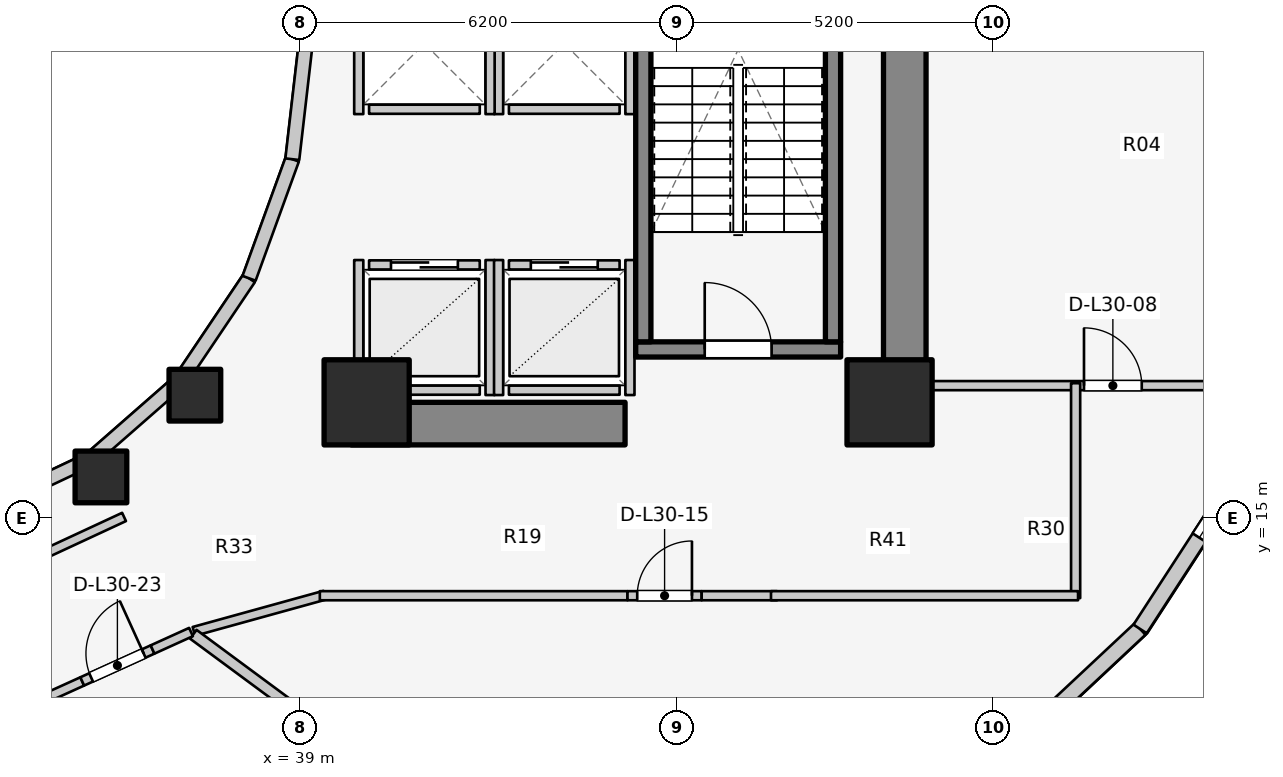
"""IFC4 building model, lengths in metres.
Left out: names, types, materials, properties, quantities, classifications, styles, units other than length and angle.
Written with IfcOpenShell. Run it as: python <this file> out.ifc"""

import sys

from ifc_helpers import new_model, si_unit, direction, frame, frame_2d, origin, origin_2d, place, context, subcontext, project, spatial, rectangle, extrude, element, fill, save


model = new_model("IFC4")
c1 = context("Model", 3, precision=1e-05, world=origin(), true_north=direction((0.0, 1.0)))
c2 = subcontext(c1, "Body", "Model", "MODEL_VIEW")
j1 = project(units=[si_unit("LENGTHUNIT", "METRE"), si_unit("PLANEANGLEUNIT", "RADIAN")], contexts=[c1])
p1 = place(None, origin())
s1 = spatial("IfcSite", under=j1, at=p1, CompositionType="ELEMENT")
p2 = place(p1, origin())
s2 = spatial("IfcBuilding", under=s1, at=p2, CompositionType="ELEMENT")
p3 = place(p2, frame((0.0, 0.0, 101.1)))
s3 = spatial("IfcBuildingStorey", under=s2, at=p3, CompositionType="ELEMENT", Elevation=101.1)
p4 = place(p3, frame((48.95, 17.05, 0.0), z_axis=(0.0, 0.0, 1.0), x_axis=(0.0, 1.0, 0.0)))
e1 = element("IfcWall", 1, at=p4, inside=s3, PredefinedType="SHEAR", context=c2, shape_type="SweptSolid", body=[
    extrude(rectangle(XDim=12.8, YDim=0.7, at=frame_2d((6.4, 0.0))), origin(), (0.0, 0.0, 1.0), 3.1),
])
p5 = place(p3, frame((39.85, 16.55, 0.0), z_axis=(0.0, 0.0, 1.0), x_axis=(1.0, 0.0, 0.0)))
e2 = element("IfcWall", 2, at=p5, inside=s3, PredefinedType="SHEAR", context=c2, shape_type="SweptSolid", body=[
    extrude(rectangle(XDim=4.5, YDim=0.7, at=frame_2d((2.25, 0.0))), origin(), (0.0, 0.0, 1.0), 3.1),
])
p6 = place(p3, frame((44.525, 17.77, 0.0), z_axis=(0.0, 0.0, 1.0), x_axis=(1.0, 0.0, 0.0)))
e3 = element("IfcWall", 3, at=p6, inside=s3, PredefinedType="SOLIDWALL", context=c2, shape_type="SweptSolid", body=[
    extrude(rectangle(XDim=3.37, YDim=0.25, at=frame_2d((1.685, 0.0))), origin(), (0.0, 0.0, 1.0), 3.1),
])
p7 = place(p6, frame((1.135, 0.0, 0.0)))
e4 = element("IfcOpeningElement", 4, at=p7, cuts=e3, PredefinedType="OPENING", context=c2, shape_type="SweptSolid", body=[
    extrude(rectangle(XDim=1.1, YDim=2.1, at=frame_2d((0.55, 1.05))), frame((0.0, 0.135, 0.0), z_axis=(0.0, -1.0, 0.0), x_axis=(1.0, 0.0, 0.0)), (0.0, 0.0, 1.0), 0.27),
])
for number, where, z_axis, x_axis in (
    (5, (44.65, 17.895, 0.0), (0.0, 0.0, 1.0), (0.0, 1.0, 0.0)),
    (6, (47.77, 17.895, 0.0), (0.0, 0.0, 1.0), (0.0, 1.0, 0.0)),
):
    element("IfcWall", number, at=place(p3, frame(where, z_axis=z_axis, x_axis=x_axis)), inside=s3, PredefinedType="SOLIDWALL", context=c2, shape_type="SweptSolid", body=[
        extrude(rectangle(XDim=7.81, YDim=0.25, at=frame_2d((3.905, 0.0))), origin(), (0.0, 0.0, 1.0), 3.1),
    ])
for number, where, z_axis, x_axis in (
    (7, (40.1, 16.9, 0.0), (0.0, 0.0, 1.0), (1.0, 0.0, 0.0)),
    (8, (48.7, 16.9, 0.0), (0.0, 0.0, 1.0), (1.0, 0.0, 0.0)),
):
    element("IfcColumn", number, at=place(p3, frame(where, z_axis=z_axis, x_axis=x_axis)), inside=s3, PredefinedType="COLUMN", context=c2, shape_type="SweptSolid", body=[
        extrude(rectangle(XDim=1.4, YDim=1.4, at=origin_2d()), origin(), (0.0, 0.0, 1.0), 3.1),
    ])
for number, where, z_axis, x_axis in (
    (9, (35.73, 15.673, 0.0), (0.0, 0.0, 1.0), (1.0, 0.0, 0.0)),
    (10, (37.275, 17.018, 0.0), (0.0, 0.0, 1.0), (1.0, 0.0, 0.0)),
):
    element("IfcColumn", number, at=place(p3, frame(where, z_axis=z_axis, x_axis=x_axis)), inside=s3, PredefinedType="COLUMN", context=c2, shape_type="SweptSolid", body=[
        extrude(rectangle(XDim=0.85, YDim=0.85, at=origin_2d()), origin(), (0.0, 0.0, 1.0), 3.1),
    ])
p8 = place(p3, frame((33.843, 15.157, 0.0), z_axis=(0.0, 0.0, 1.0), x_axis=(0.904179699603, 0.427152280606, 0.0)))
e11 = element("IfcWall", 11, at=p8, inside=s3, PredefinedType="STANDARD", context=c2, shape_type="SweptSolid", body=[
    extrude(rectangle(XDim=1.899, YDim=0.23, at=frame_2d((0.95, 0.0))), origin(), (0.0, 0.0, 1.0), 1.22),
])
p9 = place(p3, frame((35.56, 15.968, 0.0), z_axis=(0.0, 0.0, 1.0), x_axis=(0.752576694707, 0.658504607869, 0.0)))
e12 = element("IfcWall", 12, at=p9, inside=s3, PredefinedType="STANDARD", context=c2, shape_type="SweptSolid", body=[
    extrude(rectangle(XDim=1.959, YDim=0.23, at=frame_2d((0.98, 0.0))), origin(), (0.0, 0.0, 1.0), 1.22),
])
p10 = place(p3, frame((37.035, 17.258, 0.0), z_axis=(0.0, 0.0, 1.0), x_axis=(0.558197800898, 0.829707909492, 0.0)))
e13 = element("IfcWall", 13, at=p10, inside=s3, PredefinedType="STANDARD", context=c2, shape_type="SweptSolid", body=[
    extrude(rectangle(XDim=2.027, YDim=0.23, at=frame_2d((1.013, 0.0))), origin(), (0.0, 0.0, 1.0), 1.22),
])
p11 = place(p3, frame((38.166, 18.94, 0.0), z_axis=(0.0, 0.0, 1.0), x_axis=(0.341423187295, 0.93990968033, 0.0)))
e14 = element("IfcWall", 14, at=p11, inside=s3, PredefinedType="STANDARD", context=c2, shape_type="SweptSolid", body=[
    extrude(rectangle(XDim=2.084, YDim=0.23, at=frame_2d((1.042, 0.0))), origin(), (0.0, 0.0, 1.0), 2.56),
])
p12 = place(p3, frame((38.877, 20.898, 0.0), z_axis=(0.0, 0.0, 1.0), x_axis=(0.114711713601, 0.993398823617, 0.0)))
e15 = element("IfcWall", 15, at=p12, inside=s3, PredefinedType="STANDARD", context=c2, shape_type="SweptSolid", body=[
    extrude(rectangle(XDim=2.115, YDim=0.23, at=frame_2d((1.058, 0.0))), origin(), (0.0, 0.0, 1.0), 2.56),
])
p13 = place(p3, frame((49.266, 9.847, 0.0), z_axis=(0.0, 0.0, 1.0), x_axis=(0.730162452258, 0.68327358599, 0.0)))
e16 = element("IfcWall", 16, at=p13, inside=s3, PredefinedType="STANDARD", context=c2, shape_type="SweptSolid", body=[
    extrude(rectangle(XDim=4.868, YDim=0.26, at=frame_2d((2.434, 0.0))), origin(), (0.0, 0.0, 1.0), 1.22),
])
p14 = place(p13, frame((1.834, 0.0, 0.15)))
e17 = element("IfcOpeningElement", 17, at=p14, cuts=e16, PredefinedType="OPENING", context=c2, shape_type="SweptSolid", body=[
    extrude(rectangle(XDim=1.2, YDim=0.9, at=frame_2d((0.6, 0.45))), frame((0.0, 0.14, 0.0), z_axis=(0.0, -1.0, 0.0), x_axis=(1.0, 0.0, 0.0)), (0.0, 0.0, 1.0), 0.28),
])
p15 = place(p3, frame((52.821, 13.173, 0.0), z_axis=(0.0, 0.0, 1.0), x_axis=(0.544388392991, 0.838833283541, 0.0)))
e18 = element("IfcWall", 18, at=p15, inside=s3, PredefinedType="STANDARD", context=c2, shape_type="SweptSolid", body=[
    extrude(rectangle(XDim=4.778, YDim=0.26, at=frame_2d((2.389, 0.0))), origin(), (0.0, 0.0, 1.0), 1.22),
])
p16 = place(p15, frame((1.789, 0.0, 0.15)))
e19 = element("IfcOpeningElement", 19, at=p16, cuts=e18, PredefinedType="OPENING", context=c2, shape_type="SweptSolid", body=[
    extrude(rectangle(XDim=1.2, YDim=0.9, at=frame_2d((0.6, 0.45))), frame((0.0, 0.14, 0.0), z_axis=(0.0, -1.0, 0.0), x_axis=(1.0, 0.0, 0.0)), (0.0, 0.0, 1.0), 0.28),
])
p17 = place(p3, frame((40.14, 19.16, 0.0), z_axis=(0.0, 0.0, 1.0), x_axis=(1.0, 0.0, 0.0)))
e20 = element("IfcWall", 20, at=p17, inside=s3, PredefinedType="SOLIDWALL", context=c2, shape_type="SweptSolid", body=[
    extrude(rectangle(XDim=1.82, YDim=0.15, at=frame_2d((0.91, 0.0))), origin(), (0.0, 0.0, 1.0), 2.12),
])
p18 = place(p17, frame((0.36, 0.0, 0.0)))
e21 = element("IfcOpeningElement", 21, at=p18, cuts=e20, PredefinedType="OPENING", context=c2, shape_type="SweptSolid", body=[
    extrude(rectangle(XDim=1.1, YDim=2.1, at=frame_2d((0.55, 1.05))), frame((0.0, 0.085, 0.0), z_axis=(0.0, -1.0, 0.0), x_axis=(1.0, 0.0, 0.0)), (0.0, 0.0, 1.0), 0.17),
])
p19 = place(p3, frame((40.14, 17.1, 0.0), z_axis=(0.0, 0.0, 1.0), x_axis=(1.0, 0.0, 0.0)))
e22 = element("IfcWall", 22, at=p19, inside=s3, PredefinedType="SOLIDWALL", context=c2, shape_type="SweptSolid", body=[
    extrude(rectangle(XDim=1.82, YDim=0.15, at=frame_2d((0.91, 0.0))), origin(), (0.0, 0.0, 1.0), 2.12),
])
p20 = place(p3, frame((39.97, 17.02, 0.0), z_axis=(0.0, 0.0, 1.0), x_axis=(0.0, 1.0, 0.0)))
e23 = element("IfcWall", 23, at=p20, inside=s3, PredefinedType="SOLIDWALL", context=c2, shape_type="SweptSolid", body=[
    extrude(rectangle(XDim=2.22, YDim=0.15, at=frame_2d((1.11, 0.0))), origin(), (0.0, 0.0, 1.0), 1.873),
])
p21 = place(p3, frame((42.13, 17.02, 0.0), z_axis=(0.0, 0.0, 1.0), x_axis=(0.0, 1.0, 0.0)))
e24 = element("IfcWall", 24, at=p21, inside=s3, PredefinedType="SOLIDWALL", context=c2, shape_type="SweptSolid", body=[
    extrude(rectangle(XDim=2.22, YDim=0.15, at=frame_2d((1.11, 0.0))), origin(), (0.0, 0.0, 1.0), 2.575),
])
p22 = place(p3, frame((42.44, 19.16, 0.0), z_axis=(0.0, 0.0, 1.0), x_axis=(1.0, 0.0, 0.0)))
e25 = element("IfcWall", 25, at=p22, inside=s3, PredefinedType="SOLIDWALL", context=c2, shape_type="SweptSolid", body=[
    extrude(rectangle(XDim=1.82, YDim=0.15, at=frame_2d((0.91, 0.0))), origin(), (0.0, 0.0, 1.0), 2.575),
])
p23 = place(p22, frame((0.36, 0.0, 0.0)))
e26 = element("IfcOpeningElement", 26, at=p23, cuts=e25, PredefinedType="OPENING", context=c2, shape_type="SweptSolid", body=[
    extrude(rectangle(XDim=1.1, YDim=2.1, at=frame_2d((0.55, 1.05))), frame((0.0, 0.085, 0.0), z_axis=(0.0, -1.0, 0.0), x_axis=(1.0, 0.0, 0.0)), (0.0, 0.0, 1.0), 0.17),
])
p24 = place(p3, frame((42.44, 17.1, 0.0), z_axis=(0.0, 0.0, 1.0), x_axis=(1.0, 0.0, 0.0)))
e27 = element("IfcWall", 27, at=p24, inside=s3, PredefinedType="SOLIDWALL", context=c2, shape_type="SweptSolid", body=[
    extrude(rectangle(XDim=1.82, YDim=0.15, at=frame_2d((0.91, 0.0))), origin(), (0.0, 0.0, 1.0), 2.575),
])
p25 = place(p3, frame((42.27, 17.02, 0.0), z_axis=(0.0, 0.0, 1.0), x_axis=(0.0, 1.0, 0.0)))
e28 = element("IfcWall", 28, at=p25, inside=s3, PredefinedType="SOLIDWALL", context=c2, shape_type="SweptSolid", body=[
    extrude(rectangle(XDim=2.22, YDim=0.15, at=frame_2d((1.11, 0.0))), origin(), (0.0, 0.0, 1.0), 2.575),
])
p26 = place(p3, frame((44.43, 17.02, 0.0), z_axis=(0.0, 0.0, 1.0), x_axis=(0.0, 1.0, 0.0)))
e29 = element("IfcWall", 29, at=p26, inside=s3, PredefinedType="SOLIDWALL", context=c2, shape_type="SweptSolid", body=[
    extrude(rectangle(XDim=2.22, YDim=0.15, at=frame_2d((1.11, 0.0))), origin(), (0.0, 0.0, 1.0), 2.12),
])
p27 = place(p3, frame((42.44, 21.72, 0.0), z_axis=(0.0, 0.0, 1.0), x_axis=(1.0, 0.0, 0.0)))
e30 = element("IfcWall", 30, at=p27, inside=s3, PredefinedType="SOLIDWALL", context=c2, shape_type="SweptSolid", body=[
    extrude(rectangle(XDim=1.82, YDim=0.15, at=frame_2d((0.91, 0.0))), origin(), (0.0, 0.0, 1.0), 2.575),
])
for number, where, z_axis, x_axis in (
    (31, (42.27, 21.64, 0.0), (0.0, 0.0, 1.0), (0.0, 1.0, 0.0)),
    (32, (44.43, 21.64, 0.0), (0.0, 0.0, 1.0), (0.0, 1.0, 0.0)),
):
    element("IfcWall", number, at=place(p3, frame(where, z_axis=z_axis, x_axis=x_axis)), inside=s3, PredefinedType="SOLIDWALL", context=c2, shape_type="SweptSolid", body=[
        extrude(rectangle(XDim=2.32, YDim=0.15, at=frame_2d((1.16, 0.0))), origin(), (0.0, 0.0, 1.0), 2.575),
    ])
p28 = place(p3, frame((40.14, 21.72, 0.0), z_axis=(0.0, 0.0, 1.0), x_axis=(1.0, 0.0, 0.0)))
e33 = element("IfcWall", 33, at=p28, inside=s3, PredefinedType="SOLIDWALL", context=c2, shape_type="SweptSolid", body=[
    extrude(rectangle(XDim=1.82, YDim=0.15, at=frame_2d((0.91, 0.0))), origin(), (0.0, 0.0, 1.0), 2.12),
])
p29 = place(p3, frame((39.97, 21.64, 0.0), z_axis=(0.0, 0.0, 1.0), x_axis=(0.0, 1.0, 0.0)))
e34 = element("IfcWall", 34, at=p29, inside=s3, PredefinedType="SOLIDWALL", context=c2, shape_type="SweptSolid", body=[
    extrude(rectangle(XDim=2.32, YDim=0.15, at=frame_2d((1.16, 0.0))), origin(), (0.0, 0.0, 1.0), 2.12),
])
p30 = place(p3, frame((42.13, 21.64, 0.0), z_axis=(0.0, 0.0, 1.0), x_axis=(0.0, 1.0, 0.0)))
e35 = element("IfcWall", 35, at=p30, inside=s3, PredefinedType="SOLIDWALL", context=c2, shape_type="SweptSolid", body=[
    extrude(rectangle(XDim=2.32, YDim=0.15, at=frame_2d((1.16, 0.0))), origin(), (0.0, 0.0, 1.0), 2.575),
])
p31 = place(p3, frame((34.127, 14.094, 0.0), z_axis=(0.0, 0.0, 1.0), x_axis=(0.906943449489, 0.421252393975, 0.0)))
e36 = element("IfcWall", 36, at=p31, inside=s3, PredefinedType="PARTITIONING", context=c2, shape_type="SweptSolid", body=[
    extrude(rectangle(XDim=2.186, YDim=0.15, at=frame_2d((1.093, 0.0))), origin(), (0.0, 0.0, 1.0), 1.992),
])
p32 = place(p3, frame((48.95, 17.175, 0.0), z_axis=(0.0, 0.0, 1.0), x_axis=(1.0, 0.0, 0.0)))
e37 = element("IfcWall", 37, at=p32, inside=s3, PredefinedType="PARTITIONING", context=c2, shape_type="SweptSolid", body=[
    extrude(rectangle(XDim=6.492, YDim=0.15, at=frame_2d((3.246, 0.0))), origin(), (0.0, 0.0, 1.0), 2.575),
])
p33 = place(p32, frame((2.948, 0.0, 0.0)))
e38 = element("IfcOpeningElement", 38, at=p33, cuts=e37, PredefinedType="OPENING", context=c2, shape_type="SweptSolid", body=[
    extrude(rectangle(XDim=0.95, YDim=2.1, at=frame_2d((0.475, 1.05))), frame((0.0, 0.085, 0.0), z_axis=(0.0, -1.0, 0.0), x_axis=(1.0, 0.0, 0.0)), (0.0, 0.0, 1.0), 0.17),
])
p34 = place(p3, frame((51.76, 13.68, 0.0), z_axis=(0.0, 0.0, 1.0), x_axis=(0.0, 1.0, 0.0)))
e39 = element("IfcWall", 39, at=p34, inside=s3, PredefinedType="PARTITIONING", context=c2, shape_type="SweptSolid", body=[
    extrude(rectangle(XDim=3.535, YDim=0.15, at=frame_2d((1.768, 0.0))), origin(), (0.0, 0.0, 1.0), 2.575),
])
p35 = place(p3, frame((37.258, 13.133, 0.0), z_axis=(0.0, 0.0, 1.0), x_axis=(0.963833843713, 0.266503886865, 0.0)))
e40 = element("IfcWall", 40, at=p35, inside=s3, PredefinedType="PARTITIONING", context=c2, shape_type="SweptSolid", body=[
    extrude(rectangle(XDim=2.232, YDim=0.15, at=frame_2d((1.116, 0.0))), origin(), (0.0, 0.0, 1.0), 1.992),
])
p36 = place(p3, frame((39.33, 13.72, 0.0), z_axis=(0.0, 0.0, 1.0), x_axis=(1.0, 0.0, 0.0)))
e41 = element("IfcWall", 41, at=p36, inside=s3, PredefinedType="PARTITIONING", context=c2, shape_type="SweptSolid", body=[
    extrude(rectangle(XDim=5.06, YDim=0.15, at=frame_2d((2.53, 0.0))), origin(), (0.0, 0.0, 1.0), 1.992),
])
p37 = place(p3, frame((44.39, 13.72, 0.0), z_axis=(0.0, 0.0, 1.0), x_axis=(1.0, 0.0, 0.0)))
e42 = element("IfcWall", 42, at=p37, inside=s3, PredefinedType="PARTITIONING", context=c2, shape_type="SweptSolid", body=[
    extrude(rectangle(XDim=1.22, YDim=0.15, at=frame_2d((0.61, 0.0))), origin(), (0.0, 0.0, 1.0), 2.575),
])
p38 = place(p37, frame((0.16, 0.0, 0.0)))
e43 = element("IfcOpeningElement", 43, at=p38, cuts=e42, PredefinedType="OPENING", context=c2, shape_type="SweptSolid", body=[
    extrude(rectangle(XDim=0.9, YDim=2.1, at=frame_2d((0.45, 1.05))), frame((0.0, 0.085, 0.0), z_axis=(0.0, -1.0, 0.0), x_axis=(1.0, 0.0, 0.0)), (0.0, 0.0, 1.0), 0.17),
])
p39 = place(p3, frame((45.61, 13.72, 0.0), z_axis=(0.0, 0.0, 1.0), x_axis=(1.0, 0.0, 0.0)))
e44 = element("IfcWall", 44, at=p39, inside=s3, PredefinedType="PARTITIONING", context=c2, shape_type="SweptSolid", body=[
    extrude(rectangle(XDim=1.24, YDim=0.15, at=frame_2d((0.62, 0.0))), origin(), (0.0, 0.0, 1.0), 2.575),
])
p40 = place(p3, frame((46.75, 13.72, 0.0), z_axis=(0.0, 0.0, 1.0), x_axis=(1.0, 0.0, 0.0)))
e45 = element("IfcWall", 45, at=p40, inside=s3, PredefinedType="PARTITIONING", context=c2, shape_type="SweptSolid", body=[
    extrude(rectangle(XDim=5.05, YDim=0.15, at=frame_2d((2.525, 0.0))), origin(), (0.0, 0.0, 1.0), 1.22),
])
p41 = place(p3, frame((37.249, 13.086, 0.0), z_axis=(0.0, 0.0, 1.0), x_axis=(0.80430981394, -0.594210167533, 0.0)))
e46 = element("IfcWall", 46, at=p41, inside=s3, PredefinedType="PARTITIONING", context=c2, shape_type="SweptSolid", body=[
    extrude(rectangle(XDim=9.146, YDim=0.18, at=frame_2d((4.573, 0.0))), origin(), (0.0, 0.0, 1.0), 1.22),
])
p42 = place(p3, frame((34.687, 11.977, 0.0), z_axis=(0.0, 0.0, 1.0), x_axis=(0.910604459832, 0.413278982932, 0.0)))
e47 = element("IfcWall", 47, at=p42, inside=s3, PredefinedType="PARTITIONING", context=c2, shape_type="SweptSolid", body=[
    extrude(rectangle(XDim=0.808, YDim=0.15, at=frame_2d((0.404, 0.0))), origin(), (0.0, 0.0, 1.0), 1.992),
])
p43 = place(p3, frame((35.423, 12.311, 0.0), z_axis=(0.0, 0.0, 1.0), x_axis=(0.910563905594, 0.413368327075, 0.0)))
e48 = element("IfcWall", 48, at=p43, inside=s3, PredefinedType="PARTITIONING", context=c2, shape_type="SweptSolid", body=[
    extrude(rectangle(XDim=1.27, YDim=0.15, at=frame_2d((0.635, 0.0))), origin(), (0.0, 0.0, 1.0), 2.16),
])
p44 = place(p43, frame((0.16, 0.0, 0.0)))
e49 = element("IfcOpeningElement", 49, at=p44, cuts=e48, PredefinedType="OPENING", context=c2, shape_type="SweptSolid", body=[
    extrude(rectangle(XDim=0.95, YDim=2.1, at=frame_2d((0.475, 1.05))), frame((0.0, 0.085, 0.0), z_axis=(0.0, -1.0, 0.0), x_axis=(1.0, 0.0, 0.0)), (0.0, 0.0, 1.0), 0.17),
])
p45 = place(p3, frame((36.579, 12.835, 0.0), z_axis=(0.0, 0.0, 1.0), x_axis=(0.910534957096, 0.413432088627, 0.0)))
e50 = element("IfcWall", 50, at=p45, inside=s3, PredefinedType="PARTITIONING", context=c2, shape_type="SweptSolid", body=[
    extrude(rectangle(XDim=0.694, YDim=0.15, at=frame_2d((0.347, 0.0))), origin(), (0.0, 0.0, 1.0), 2.575),
])
p46 = place(p16, origin())
e51 = element("IfcWindow", 51, at=p46, inside=s3, PartitioningType="SINGLE_PANEL", PredefinedType="WINDOW", context=c2, shape_type="SweptSolid", body=[
    extrude(rectangle(XDim=1.2, YDim=0.9, at=frame_2d((0.6, 0.45))), frame((0.0, 0.03, 0.0), z_axis=(0.0, -1.0, 0.0), x_axis=(1.0, 0.0, 0.0)), (0.0, 0.0, 1.0), 0.06),
])
fill(e19, e51)
p47 = place(p7, origin())
e52 = element("IfcDoor", 52, at=p47, inside=s3, OperationType="SINGLE_SWING_LEFT", PredefinedType="DOOR", context=c2, shape_type="SweptSolid", body=[
    extrude(rectangle(XDim=1.1, YDim=2.1, at=frame_2d((0.55, 1.05))), frame((0.0, 0.025, 0.0), z_axis=(0.0, -1.0, 0.0), x_axis=(1.0, 0.0, 0.0)), (0.0, 0.0, 1.0), 0.05),
])
fill(e4, e52)
p48 = place(p18, origin())
e53 = element("IfcDoor", 53, at=p48, inside=s3, OperationType="DOUBLE_DOOR_SLIDING", PredefinedType="DOOR", context=c2, shape_type="SweptSolid", body=[
    extrude(rectangle(XDim=1.1, YDim=2.1, at=frame_2d((0.55, 1.05))), frame((0.0, 0.025, 0.0), z_axis=(0.0, -1.0, 0.0), x_axis=(1.0, 0.0, 0.0)), (0.0, 0.0, 1.0), 0.05),
])
fill(e21, e53)
p49 = place(p23, origin())
e54 = element("IfcDoor", 54, at=p49, inside=s3, OperationType="DOUBLE_DOOR_SLIDING", PredefinedType="DOOR", context=c2, shape_type="SweptSolid", body=[
    extrude(rectangle(XDim=1.1, YDim=2.1, at=frame_2d((0.55, 1.05))), frame((0.0, 0.025, 0.0), z_axis=(0.0, -1.0, 0.0), x_axis=(1.0, 0.0, 0.0)), (0.0, 0.0, 1.0), 0.05),
])
fill(e26, e54)
p50 = place(p33, origin())
e55 = element("IfcDoor", 55, at=p50, inside=s3, OperationType="SINGLE_SWING_LEFT", PredefinedType="DOOR", context=c2, shape_type="SweptSolid", body=[
    extrude(rectangle(XDim=0.95, YDim=2.1, at=frame_2d((0.475, 1.05))), frame((0.0, 0.025, 0.0), z_axis=(0.0, -1.0, 0.0), x_axis=(1.0, 0.0, 0.0)), (0.0, 0.0, 1.0), 0.05),
])
fill(e38, e55)
p51 = place(p38, origin())
e56 = element("IfcDoor", 56, at=p51, inside=s3, OperationType="SINGLE_SWING_RIGHT", PredefinedType="DOOR", context=c2, shape_type="SweptSolid", body=[
    extrude(rectangle(XDim=0.9, YDim=2.1, at=frame_2d((0.45, 1.05))), frame((0.0, 0.025, 0.0), z_axis=(0.0, -1.0, 0.0), x_axis=(1.0, 0.0, 0.0)), (0.0, 0.0, 1.0), 0.05),
])
fill(e43, e56)
p52 = place(p44, origin())
e57 = element("IfcDoor", 57, at=p52, inside=s3, OperationType="SINGLE_SWING_RIGHT", PredefinedType="DOOR", context=c2, shape_type="SweptSolid", body=[
    extrude(rectangle(XDim=0.95, YDim=2.1, at=frame_2d((0.475, 1.05))), frame((0.0, 0.025, 0.0), z_axis=(0.0, -1.0, 0.0), x_axis=(1.0, 0.0, 0.0)), (0.0, 0.0, 1.0), 0.05),
])
fill(e49, e57)
save(model, sys.argv[1])
